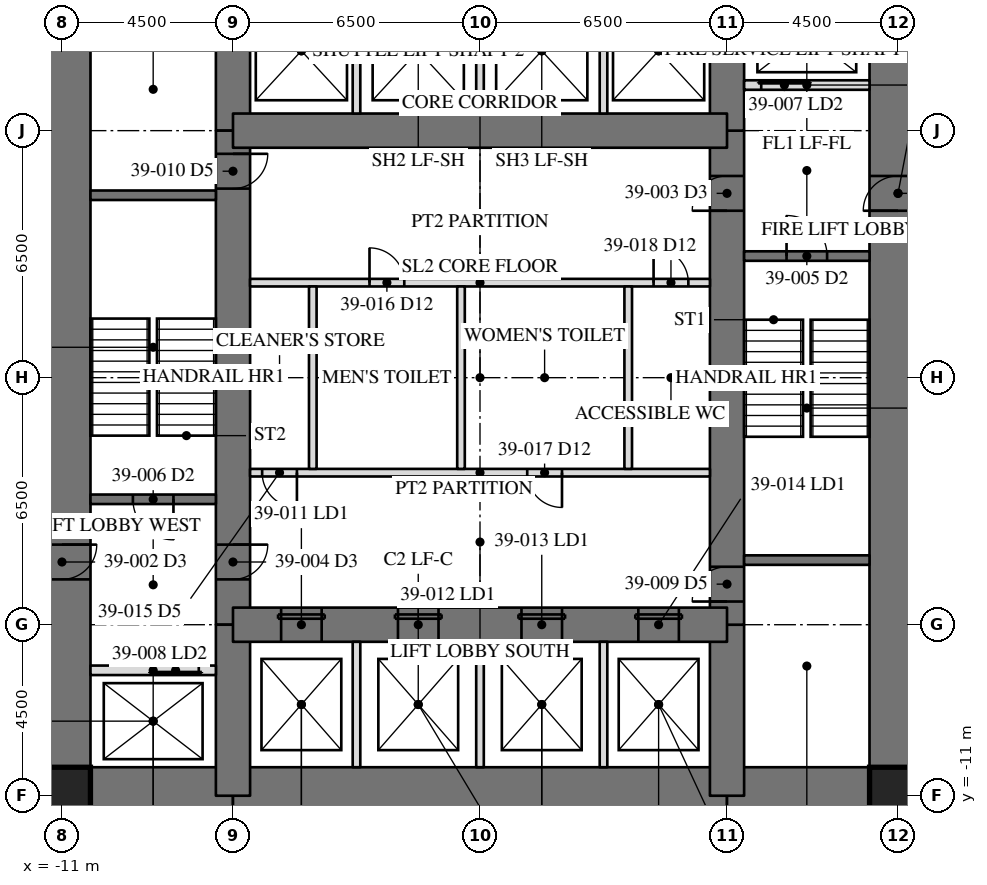
"""IFC4 building model, lengths in metres.
Left out: names, types, materials, properties, quantities, classifications, styles, units other than length and angle.
Written with IfcOpenShell. Run it as: python <this file> out.ifc"""

import sys

from ifc_helpers import new_model, si_unit, direction, frame, frame_2d, origin, origin_2d, place, context, subcontext, project, spatial, rectangle, hollow_rectangle, extrude, element, fill, save


model = new_model("IFC4")
c1 = context("Model", 3, precision=1e-05, world=origin(), true_north=direction((0.0, 1.0)))
c2 = subcontext(c1, "Body", "Model", "MODEL_VIEW")
j1 = project(units=[si_unit("LENGTHUNIT", "METRE"), si_unit("PLANEANGLEUNIT", "RADIAN")], contexts=[c1])
p1 = place(None, origin())
s1 = spatial("IfcSite", under=j1, at=p1, CompositionType="ELEMENT")
p2 = place(p1, origin())
s2 = spatial("IfcBuilding", under=s1, at=p2, CompositionType="ELEMENT")
p3 = place(p2, frame((0.0, 0.0, 166.4)))
s3 = spatial("IfcBuildingStorey", under=s2, at=p3, CompositionType="ELEMENT", Elevation=166.4)
p4 = place(p3, frame((11.0, -11.0, 0.0), z_axis=(0.0, 0.0, 1.0), x_axis=(0.0, 1.0, 0.0)))
e1 = element("IfcWall", 1, at=p4, inside=s3, PredefinedType="SHEAR", context=c2, shape_type="SweptSolid", body=[
    extrude(rectangle(XDim=22.0, YDim=1.5, at=frame_2d((11.0, 0.0))), origin(), (0.0, 0.0, 1.0), 4.1),
])
p5 = place(p4, frame((15.393, 0.0, 0.0)))
e2 = element("IfcOpeningElement", 2, at=p5, cuts=e1, PredefinedType="OPENING", context=c2, shape_type="SweptSolid", body=[
    extrude(rectangle(XDim=0.915, YDim=2.134, at=frame_2d((0.458, 1.067))), frame((0.0, 0.76, 0.0), z_axis=(0.0, -1.0, 0.0), x_axis=(1.0, 0.0, 0.0)), (0.0, 0.0, 1.0), 1.52),
])
p6 = place(p3, frame((-11.0, 11.0, 0.0), z_axis=(0.0, 0.0, 1.0), x_axis=(0.0, -1.0, 0.0)))
e3 = element("IfcWall", 3, at=p6, inside=s3, PredefinedType="SHEAR", context=c2, shape_type="SweptSolid", body=[
    extrude(rectangle(XDim=22.0, YDim=1.5, at=frame_2d((11.0, 0.0))), origin(), (0.0, 0.0, 1.0), 4.1),
])
p7 = place(p6, frame((15.393, 0.0, 0.0)))
e4 = element("IfcOpeningElement", 4, at=p7, cuts=e3, PredefinedType="OPENING", context=c2, shape_type="SweptSolid", body=[
    extrude(rectangle(XDim=0.915, YDim=2.134, at=frame_2d((0.458, 1.067))), frame((0.0, 0.76, 0.0), z_axis=(0.0, -1.0, 0.0), x_axis=(1.0, 0.0, 0.0)), (0.0, 0.0, 1.0), 1.52),
])
p8 = place(p3, frame((-11.0, -11.0, 0.0), z_axis=(0.0, 0.0, 1.0), x_axis=(1.0, 0.0, 0.0)))
e5 = element("IfcWall", 5, at=p8, inside=s3, PredefinedType="SHEAR", context=c2, shape_type="SweptSolid", body=[
    extrude(rectangle(XDim=4.5, YDim=1.5, at=frame_2d((2.25, 0.0))), origin(), (0.0, 0.0, 1.0), 4.1),
])
p9 = place(p3, frame((-6.5, -11.0, 0.0), z_axis=(0.0, 0.0, 1.0), x_axis=(1.0, 0.0, 0.0)))
e6 = element("IfcWall", 6, at=p9, inside=s3, PredefinedType="SHEAR", context=c2, shape_type="SweptSolid", body=[
    extrude(rectangle(XDim=13.0, YDim=1.5, at=frame_2d((6.5, 0.0))), origin(), (0.0, 0.0, 1.0), 4.1),
])
p10 = place(p3, frame((6.5, -11.0, 0.0), z_axis=(0.0, 0.0, 1.0), x_axis=(1.0, 0.0, 0.0)))
e7 = element("IfcWall", 7, at=p10, inside=s3, PredefinedType="SHEAR", context=c2, shape_type="SweptSolid", body=[
    extrude(rectangle(XDim=4.5, YDim=1.5, at=frame_2d((2.25, 0.0))), origin(), (0.0, 0.0, 1.0), 4.1),
])
p11 = place(p3, frame((6.5, -11.0, 0.0), z_axis=(0.0, 0.0, 1.0), x_axis=(0.0, 1.0, 0.0)))
e8 = element("IfcWall", 8, at=p11, inside=s3, PredefinedType="SHEAR", context=c2, shape_type="SweptSolid", body=[
    extrude(rectangle(XDim=4.5, YDim=0.9, at=frame_2d((2.25, 0.0))), origin(), (0.0, 0.0, 1.0), 4.1),
])
p12 = place(p3, frame((6.5, -6.5, 0.0), z_axis=(0.0, 0.0, 1.0), x_axis=(0.0, 1.0, 0.0)))
e9 = element("IfcWall", 9, at=p12, inside=s3, PredefinedType="SHEAR", context=c2, shape_type="SweptSolid", body=[
    extrude(rectangle(XDim=13.0, YDim=0.9, at=frame_2d((6.5, 0.0))), origin(), (0.0, 0.0, 1.0), 4.1),
])
p13 = place(p12, frame((10.893, 0.0, 0.0)))
e10 = element("IfcOpeningElement", 10, at=p13, cuts=e9, PredefinedType="OPENING", context=c2, shape_type="SweptSolid", body=[
    extrude(rectangle(XDim=0.915, YDim=2.134, at=frame_2d((0.458, 1.067))), frame((0.0, 0.46, 0.0), z_axis=(0.0, -1.0, 0.0), x_axis=(1.0, 0.0, 0.0)), (0.0, 0.0, 1.0), 0.92),
])
p14 = place(p12, frame((0.61, 0.0, 0.0)))
e11 = element("IfcOpeningElement", 11, at=p14, cuts=e9, PredefinedType="OPENING", context=c2, shape_type="SweptSolid", body=[
    extrude(rectangle(XDim=0.915, YDim=2.134, at=frame_2d((0.458, 1.067))), frame((0.0, 0.46, 0.0), z_axis=(0.0, -1.0, 0.0), x_axis=(1.0, 0.0, 0.0)), (0.0, 0.0, 1.0), 0.92),
])
for number, where, z_axis, x_axis in (
    (12, (6.5, 6.5, 0.0), (0.0, 0.0, 1.0), (0.0, 1.0, 0.0)),
    (13, (-6.5, 11.0, 0.0), (0.0, 0.0, 1.0), (0.0, -1.0, 0.0)),
):
    element("IfcWall", number, at=place(p3, frame(where, z_axis=z_axis, x_axis=x_axis)), inside=s3, PredefinedType="SHEAR", context=c2, shape_type="SweptSolid", body=[
        extrude(rectangle(XDim=4.5, YDim=0.9, at=frame_2d((2.25, 0.0))), origin(), (0.0, 0.0, 1.0), 4.1),
    ])
p15 = place(p3, frame((-6.5, 6.5, 0.0), z_axis=(0.0, 0.0, 1.0), x_axis=(0.0, -1.0, 0.0)))
e14 = element("IfcWall", 14, at=p15, inside=s3, PredefinedType="SHEAR", context=c2, shape_type="SweptSolid", body=[
    extrude(rectangle(XDim=13.0, YDim=0.9, at=frame_2d((6.5, 0.0))), origin(), (0.0, 0.0, 1.0), 4.1),
])
p16 = place(p15, frame((10.893, 0.0, 0.0)))
e15 = element("IfcOpeningElement", 15, at=p16, cuts=e14, PredefinedType="OPENING", context=c2, shape_type="SweptSolid", body=[
    extrude(rectangle(XDim=0.915, YDim=2.134, at=frame_2d((0.458, 1.067))), frame((0.0, 0.46, 0.0), z_axis=(0.0, -1.0, 0.0), x_axis=(1.0, 0.0, 0.0)), (0.0, 0.0, 1.0), 0.92),
])
p17 = place(p15, frame((0.61, 0.0, 0.0)))
e16 = element("IfcOpeningElement", 16, at=p17, cuts=e14, PredefinedType="OPENING", context=c2, shape_type="SweptSolid", body=[
    extrude(rectangle(XDim=0.915, YDim=2.134, at=frame_2d((0.458, 1.067))), frame((0.0, 0.46, 0.0), z_axis=(0.0, -1.0, 0.0), x_axis=(1.0, 0.0, 0.0)), (0.0, 0.0, 1.0), 0.92),
])
p18 = place(p3, frame((-6.5, -6.5, 0.0), z_axis=(0.0, 0.0, 1.0), x_axis=(0.0, -1.0, 0.0)))
e17 = element("IfcWall", 17, at=p18, inside=s3, PredefinedType="SHEAR", context=c2, shape_type="SweptSolid", body=[
    extrude(rectangle(XDim=4.5, YDim=0.9, at=frame_2d((2.25, 0.0))), origin(), (0.0, 0.0, 1.0), 4.1),
])
p19 = place(p3, frame((6.5, 6.5, 0.0), z_axis=(0.0, 0.0, 1.0), x_axis=(-1.0, 0.0, 0.0)))
e18 = element("IfcWall", 18, at=p19, inside=s3, PredefinedType="SHEAR", context=c2, shape_type="SweptSolid", body=[
    extrude(rectangle(XDim=13.0, YDim=0.9, at=frame_2d((6.5, 0.0))), origin(), (0.0, 0.0, 1.0), 4.1),
])
p20 = place(p3, frame((-6.5, -6.5, 0.0), z_axis=(0.0, 0.0, 1.0), x_axis=(1.0, 0.0, 0.0)))
e19 = element("IfcWall", 19, at=p20, inside=s3, PredefinedType="SHEAR", context=c2, shape_type="SweptSolid", body=[
    extrude(rectangle(XDim=13.0, YDim=0.9, at=frame_2d((6.5, 0.0))), origin(), (0.0, 0.0, 1.0), 4.1),
])
p21 = place(p20, frame((1.267, 0.0, 0.0)))
e20 = element("IfcOpeningElement", 20, at=p21, cuts=e19, PredefinedType="OPENING", context=c2, shape_type="SweptSolid", body=[
    extrude(rectangle(XDim=1.067, YDim=2.134, at=frame_2d((0.533, 1.067))), frame((0.0, 0.46, 0.0), z_axis=(0.0, -1.0, 0.0), x_axis=(1.0, 0.0, 0.0)), (0.0, 0.0, 1.0), 0.92),
])
p22 = place(p20, frame((4.342, 0.0, 0.0)))
e21 = element("IfcOpeningElement", 21, at=p22, cuts=e19, PredefinedType="OPENING", context=c2, shape_type="SweptSolid", body=[
    extrude(rectangle(XDim=1.067, YDim=2.134, at=frame_2d((0.533, 1.067))), frame((0.0, 0.46, 0.0), z_axis=(0.0, -1.0, 0.0), x_axis=(1.0, 0.0, 0.0)), (0.0, 0.0, 1.0), 0.92),
])
p23 = place(p20, frame((7.592, 0.0, 0.0)))
e22 = element("IfcOpeningElement", 22, at=p23, cuts=e19, PredefinedType="OPENING", context=c2, shape_type="SweptSolid", body=[
    extrude(rectangle(XDim=1.067, YDim=2.134, at=frame_2d((0.533, 1.067))), frame((0.0, 0.46, 0.0), z_axis=(0.0, -1.0, 0.0), x_axis=(1.0, 0.0, 0.0)), (0.0, 0.0, 1.0), 0.92),
])
p24 = place(p20, frame((10.667, 0.0, 0.0)))
e23 = element("IfcOpeningElement", 23, at=p24, cuts=e19, PredefinedType="OPENING", context=c2, shape_type="SweptSolid", body=[
    extrude(rectangle(XDim=1.067, YDim=2.134, at=frame_2d((0.533, 1.067))), frame((0.0, 0.46, 0.0), z_axis=(0.0, -1.0, 0.0), x_axis=(1.0, 0.0, 0.0)), (0.0, 0.0, 1.0), 0.92),
])
for number, where, z_axis, x_axis in (
    (24, (-11.0, -11.0, 0.0), (0.0, 0.0, 1.0), (1.0, 0.0, 0.0)),
    (25, (11.0, -11.0, 0.0), (0.0, 0.0, 1.0), (1.0, 0.0, 0.0)),
):
    element("IfcColumn", number, at=place(p3, frame(where, z_axis=z_axis, x_axis=x_axis)), inside=s3, PredefinedType="COLUMN", context=c2, shape_type="SweptSolid", body=[
        extrude(hollow_rectangle(XDim=1.499, YDim=1.499, WallThickness=0.102, at=origin_2d()), origin(), (0.0, 0.0, 1.0), 4.1),
    ])
for number, where, z_axis, x_axis in (
    (26, (6.95, -4.8, 0.0), (0.0, 0.0, 1.0), (1.0, 0.0, 0.0)),
    (27, (-6.95, 4.8, 0.0), (0.0, 0.0, 1.0), (-1.0, 0.0, 0.0)),
):
    element("IfcWall", number, at=place(p3, frame(where, z_axis=z_axis, x_axis=x_axis)), inside=s3, PredefinedType="SOLIDWALL", context=c2, shape_type="SweptSolid", body=[
        extrude(rectangle(XDim=3.3, YDim=0.25, at=frame_2d((1.65, 0.0))), origin(), (0.0, 0.0, 1.0), 3.91),
    ])
p25 = place(p3, frame((6.95, 3.2, 0.0), z_axis=(0.0, 0.0, 1.0), x_axis=(1.0, 0.0, 0.0)))
e28 = element("IfcWall", 28, at=p25, inside=s3, PredefinedType="SOLIDWALL", context=c2, shape_type="SweptSolid", body=[
    extrude(rectangle(XDim=3.3, YDim=0.25, at=frame_2d((1.65, 0.0))), origin(), (0.0, 0.0, 1.0), 3.91),
])
p26 = place(p25, frame((1.116, 0.0, 0.0)))
e29 = element("IfcOpeningElement", 29, at=p26, cuts=e28, PredefinedType="OPENING", context=c2, shape_type="SweptSolid", body=[
    extrude(rectangle(XDim=1.067, YDim=2.134, at=frame_2d((0.533, 1.067))), frame((0.0, 0.135, 0.0), z_axis=(0.0, -1.0, 0.0), x_axis=(1.0, 0.0, 0.0)), (0.0, 0.0, 1.0), 0.27),
])
p27 = place(p3, frame((-6.95, -3.2, 0.0), z_axis=(0.0, 0.0, 1.0), x_axis=(-1.0, 0.0, 0.0)))
e30 = element("IfcWall", 30, at=p27, inside=s3, PredefinedType="SOLIDWALL", context=c2, shape_type="SweptSolid", body=[
    extrude(rectangle(XDim=3.3, YDim=0.25, at=frame_2d((1.65, 0.0))), origin(), (0.0, 0.0, 1.0), 3.91),
])
p28 = place(p27, frame((1.116, 0.0, 0.0)))
e31 = element("IfcOpeningElement", 31, at=p28, cuts=e30, PredefinedType="OPENING", context=c2, shape_type="SweptSolid", body=[
    extrude(rectangle(XDim=1.067, YDim=2.134, at=frame_2d((0.533, 1.067))), frame((0.0, 0.135, 0.0), z_axis=(0.0, -1.0, 0.0), x_axis=(1.0, 0.0, 0.0)), (0.0, 0.0, 1.0), 0.27),
])
p29 = place(p3, frame((6.95, 7.7, 0.0), z_axis=(0.0, 0.0, 1.0), x_axis=(1.0, 0.0, 0.0)))
e32 = element("IfcWall", 32, at=p29, inside=s3, PredefinedType="PARTITIONING", context=c2, shape_type="SweptSolid", body=[
    extrude(rectangle(XDim=3.3, YDim=0.25, at=frame_2d((1.65, 0.0))), origin(), (0.0, 0.0, 1.0), 3.91),
])
p30 = place(p29, frame((0.45, 0.0, 0.0)))
e33 = element("IfcOpeningElement", 33, at=p30, cuts=e32, PredefinedType="OPENING", context=c2, shape_type="SweptSolid", body=[
    extrude(rectangle(XDim=1.219, YDim=2.134, at=frame_2d((0.609, 1.067))), frame((0.0, 0.135, 0.0), z_axis=(0.0, -1.0, 0.0), x_axis=(1.0, 0.0, 0.0)), (0.0, 0.0, 1.0), 0.27),
])
p31 = place(p3, frame((-6.95, -7.7, 0.0), z_axis=(0.0, 0.0, 1.0), x_axis=(-1.0, 0.0, 0.0)))
e34 = element("IfcWall", 34, at=p31, inside=s3, PredefinedType="PARTITIONING", context=c2, shape_type="SweptSolid", body=[
    extrude(rectangle(XDim=3.3, YDim=0.25, at=frame_2d((1.65, 0.0))), origin(), (0.0, 0.0, 1.0), 3.91),
])
p32 = place(p31, frame((0.45, 0.0, 0.0)))
e35 = element("IfcOpeningElement", 35, at=p32, cuts=e34, PredefinedType="OPENING", context=c2, shape_type="SweptSolid", body=[
    extrude(rectangle(XDim=1.219, YDim=2.134, at=frame_2d((0.609, 1.067))), frame((0.0, 0.135, 0.0), z_axis=(0.0, -1.0, 0.0), x_axis=(1.0, 0.0, 0.0)), (0.0, 0.0, 1.0), 0.27),
])
p33 = place(p3, frame((-6.05, 2.5, 0.0), z_axis=(0.0, 0.0, 1.0), x_axis=(1.0, 0.0, 0.0)))
e36 = element("IfcWall", 36, at=p33, inside=s3, PredefinedType="PARTITIONING", context=c2, shape_type="SweptSolid", body=[
    extrude(rectangle(XDim=12.1, YDim=0.2, at=frame_2d((6.05, 0.0))), origin(), (0.0, 0.0, 1.0), 3.91),
])
p34 = place(p33, frame((3.143, 0.0, 0.0)))
e37 = element("IfcOpeningElement", 37, at=p34, cuts=e36, PredefinedType="OPENING", context=c2, shape_type="SweptSolid", body=[
    extrude(rectangle(XDim=0.915, YDim=2.134, at=frame_2d((0.458, 1.067))), frame((0.0, 0.11, 0.0), z_axis=(0.0, -1.0, 0.0), x_axis=(1.0, 0.0, 0.0)), (0.0, 0.0, 1.0), 0.22),
])
p35 = place(p33, frame((10.617, 0.0, 0.0)))
e38 = element("IfcOpeningElement", 38, at=p35, cuts=e36, PredefinedType="OPENING", context=c2, shape_type="SweptSolid", body=[
    extrude(rectangle(XDim=0.915, YDim=2.134, at=frame_2d((0.458, 1.067))), frame((0.0, 0.11, 0.0), z_axis=(0.0, -1.0, 0.0), x_axis=(1.0, 0.0, 0.0)), (0.0, 0.0, 1.0), 0.22),
])
p36 = place(p3, frame((6.05, -2.5, 0.0), z_axis=(0.0, 0.0, 1.0), x_axis=(-1.0, 0.0, 0.0)))
e39 = element("IfcWall", 39, at=p36, inside=s3, PredefinedType="PARTITIONING", context=c2, shape_type="SweptSolid", body=[
    extrude(rectangle(XDim=12.1, YDim=0.2, at=frame_2d((6.05, 0.0))), origin(), (0.0, 0.0, 1.0), 3.91),
])
p37 = place(p36, frame((10.867, 0.0, 0.0)))
e40 = element("IfcOpeningElement", 40, at=p37, cuts=e39, PredefinedType="OPENING", context=c2, shape_type="SweptSolid", body=[
    extrude(rectangle(XDim=0.915, YDim=2.134, at=frame_2d((0.458, 1.067))), frame((0.0, 0.11, 0.0), z_axis=(0.0, -1.0, 0.0), x_axis=(1.0, 0.0, 0.0)), (0.0, 0.0, 1.0), 0.22),
])
p38 = place(p36, frame((3.893, 0.0, 0.0)))
e41 = element("IfcOpeningElement", 41, at=p38, cuts=e39, PredefinedType="OPENING", context=c2, shape_type="SweptSolid", body=[
    extrude(rectangle(XDim=0.915, YDim=2.134, at=frame_2d((0.458, 1.067))), frame((0.0, 0.11, 0.0), z_axis=(0.0, -1.0, 0.0), x_axis=(1.0, 0.0, 0.0)), (0.0, 0.0, 1.0), 0.22),
])
for number, where, z_axis, x_axis in (
    (42, (-3.25, 6.95, 0.0), (0.0, 0.0, 1.0), (0.0, 1.0, 0.0)),
    (43, (0.0, 6.95, 0.0), (0.0, 0.0, 1.0), (0.0, 1.0, 0.0)),
    (44, (3.25, 6.95, 0.0), (0.0, 0.0, 1.0), (0.0, 1.0, 0.0)),
    (45, (-3.25, -10.25, 0.0), (0.0, 0.0, 1.0), (0.0, 1.0, 0.0)),
    (46, (0.0, -10.25, 0.0), (0.0, 0.0, 1.0), (0.0, 1.0, 0.0)),
    (47, (3.25, -10.25, 0.0), (0.0, 0.0, 1.0), (0.0, 1.0, 0.0)),
):
    element("IfcWall", number, at=place(p3, frame(where, z_axis=z_axis, x_axis=x_axis)), inside=s3, PredefinedType="PARTITIONING", context=c2, shape_type="SweptSolid", body=[
        extrude(rectangle(XDim=3.3, YDim=0.2, at=frame_2d((1.65, 0.0))), origin(), (0.0, 0.0, 1.0), 3.91),
    ])
for number, where, z_axis, x_axis in (
    (48, (-4.4, -2.4, 0.0), (0.0, 0.0, 1.0), (0.0, 1.0, 0.0)),
    (49, (-0.5, -2.4, 0.0), (0.0, 0.0, 1.0), (0.0, 1.0, 0.0)),
    (50, (3.9, -2.4, 0.0), (0.0, 0.0, 1.0), (0.0, 1.0, 0.0)),
):
    element("IfcWall", number, at=place(p3, frame(where, z_axis=z_axis, x_axis=x_axis)), inside=s3, PredefinedType="PARTITIONING", context=c2, shape_type="SweptSolid", body=[
        extrude(rectangle(XDim=4.8, YDim=0.2, at=frame_2d((2.4, 0.0))), origin(), (0.0, 0.0, 1.0), 3.91),
    ])
p39 = place(p13, origin())
e51 = element("IfcDoor", 51, at=p39, inside=s3, OperationType="SINGLE_SWING_RIGHT", PredefinedType="DOOR", context=c2, shape_type="SweptSolid", body=[
    extrude(rectangle(XDim=0.915, YDim=2.134, at=frame_2d((0.458, 1.067))), frame((0.0, -0.375, 0.0), z_axis=(0.0, -1.0, 0.0), x_axis=(1.0, 0.0, 0.0)), (0.0, 0.0, 1.0), 0.05),
])
fill(e10, e51)
p40 = place(p16, origin())
e52 = element("IfcDoor", 52, at=p40, inside=s3, OperationType="SINGLE_SWING_RIGHT", PredefinedType="DOOR", context=c2, shape_type="SweptSolid", body=[
    extrude(rectangle(XDim=0.915, YDim=2.134, at=frame_2d((0.458, 1.067))), frame((0.0, -0.375, 0.0), z_axis=(0.0, -1.0, 0.0), x_axis=(1.0, 0.0, 0.0)), (0.0, 0.0, 1.0), 0.05),
])
fill(e15, e52)
p41 = place(p26, origin())
e53 = element("IfcDoor", 53, at=p41, inside=s3, OperationType="SINGLE_SWING_LEFT", PredefinedType="DOOR", context=c2, shape_type="SweptSolid", body=[
    extrude(rectangle(XDim=1.067, YDim=2.134, at=frame_2d((0.533, 1.067))), frame((0.0, 0.025, 0.0), z_axis=(0.0, -1.0, 0.0), x_axis=(1.0, 0.0, 0.0)), (0.0, 0.0, 1.0), 0.05),
])
fill(e29, e53)
p42 = place(p28, origin())
e54 = element("IfcDoor", 54, at=p42, inside=s3, OperationType="SINGLE_SWING_LEFT", PredefinedType="DOOR", context=c2, shape_type="SweptSolid", body=[
    extrude(rectangle(XDim=1.067, YDim=2.134, at=frame_2d((0.533, 1.067))), frame((0.0, 0.025, 0.0), z_axis=(0.0, -1.0, 0.0), x_axis=(1.0, 0.0, 0.0)), (0.0, 0.0, 1.0), 0.05),
])
fill(e31, e54)
p43 = place(p30, origin())
e55 = element("IfcDoor", 55, at=p43, inside=s3, OperationType="SLIDING_TO_LEFT", PredefinedType="DOOR", context=c2, shape_type="SweptSolid", body=[
    extrude(rectangle(XDim=1.219, YDim=2.134, at=frame_2d((0.609, 1.067))), frame((0.0, 0.025, 0.0), z_axis=(0.0, -1.0, 0.0), x_axis=(1.0, 0.0, 0.0)), (0.0, 0.0, 1.0), 0.05),
])
fill(e33, e55)
p44 = place(p32, origin())
e56 = element("IfcDoor", 56, at=p44, inside=s3, OperationType="SLIDING_TO_LEFT", PredefinedType="DOOR", context=c2, shape_type="SweptSolid", body=[
    extrude(rectangle(XDim=1.219, YDim=2.134, at=frame_2d((0.609, 1.067))), frame((0.0, 0.025, 0.0), z_axis=(0.0, -1.0, 0.0), x_axis=(1.0, 0.0, 0.0)), (0.0, 0.0, 1.0), 0.05),
])
fill(e35, e56)
p45 = place(p14, origin())
e57 = element("IfcDoor", 57, at=p45, inside=s3, OperationType="SINGLE_SWING_RIGHT", PredefinedType="DOOR", context=c2, shape_type="SweptSolid", body=[
    extrude(rectangle(XDim=0.915, YDim=2.134, at=frame_2d((0.458, 1.067))), frame((0.0, -0.375, 0.0), z_axis=(0.0, -1.0, 0.0), x_axis=(1.0, 0.0, 0.0)), (0.0, 0.0, 1.0), 0.05),
])
fill(e11, e57)
p46 = place(p17, origin())
e58 = element("IfcDoor", 58, at=p46, inside=s3, OperationType="SINGLE_SWING_RIGHT", PredefinedType="DOOR", context=c2, shape_type="SweptSolid", body=[
    extrude(rectangle(XDim=0.915, YDim=2.134, at=frame_2d((0.458, 1.067))), frame((0.0, -0.375, 0.0), z_axis=(0.0, -1.0, 0.0), x_axis=(1.0, 0.0, 0.0)), (0.0, 0.0, 1.0), 0.05),
])
fill(e16, e58)
p47 = place(p21, origin())
e59 = element("IfcDoor", 59, at=p47, inside=s3, OperationType="SLIDING_TO_LEFT", PredefinedType="DOOR", context=c2, shape_type="SweptSolid", body=[
    extrude(rectangle(XDim=1.067, YDim=2.134, at=frame_2d((0.533, 1.067))), frame((0.0, -0.375, 0.0), z_axis=(0.0, -1.0, 0.0), x_axis=(1.0, 0.0, 0.0)), (0.0, 0.0, 1.0), 0.05),
])
fill(e20, e59)
p48 = place(p22, origin())
e60 = element("IfcDoor", 60, at=p48, inside=s3, OperationType="SLIDING_TO_LEFT", PredefinedType="DOOR", context=c2, shape_type="SweptSolid", body=[
    extrude(rectangle(XDim=1.067, YDim=2.134, at=frame_2d((0.533, 1.067))), frame((0.0, -0.375, 0.0), z_axis=(0.0, -1.0, 0.0), x_axis=(1.0, 0.0, 0.0)), (0.0, 0.0, 1.0), 0.05),
])
fill(e21, e60)
p49 = place(p23, origin())
e61 = element("IfcDoor", 61, at=p49, inside=s3, OperationType="SLIDING_TO_LEFT", PredefinedType="DOOR", context=c2, shape_type="SweptSolid", body=[
    extrude(rectangle(XDim=1.067, YDim=2.134, at=frame_2d((0.533, 1.067))), frame((0.0, -0.375, 0.0), z_axis=(0.0, -1.0, 0.0), x_axis=(1.0, 0.0, 0.0)), (0.0, 0.0, 1.0), 0.05),
])
fill(e22, e61)
p50 = place(p24, origin())
e62 = element("IfcDoor", 62, at=p50, inside=s3, OperationType="SLIDING_TO_LEFT", PredefinedType="DOOR", context=c2, shape_type="SweptSolid", body=[
    extrude(rectangle(XDim=1.067, YDim=2.134, at=frame_2d((0.533, 1.067))), frame((0.0, -0.375, 0.0), z_axis=(0.0, -1.0, 0.0), x_axis=(1.0, 0.0, 0.0)), (0.0, 0.0, 1.0), 0.05),
])
fill(e23, e62)
p51 = place(p37, origin())
e63 = element("IfcDoor", 63, at=p51, inside=s3, OperationType="SINGLE_SWING_RIGHT", PredefinedType="DOOR", context=c2, shape_type="SweptSolid", body=[
    extrude(rectangle(XDim=0.915, YDim=2.134, at=frame_2d((0.458, 1.067))), frame((0.0, 0.025, 0.0), z_axis=(0.0, -1.0, 0.0), x_axis=(1.0, 0.0, 0.0)), (0.0, 0.0, 1.0), 0.05),
])
fill(e40, e63)
p52 = place(p34, origin())
e64 = element("IfcDoor", 64, at=p52, inside=s3, OperationType="SINGLE_SWING_LEFT", PredefinedType="DOOR", context=c2, shape_type="SweptSolid", body=[
    extrude(rectangle(XDim=0.915, YDim=2.134, at=frame_2d((0.458, 1.067))), frame((0.0, 0.025, 0.0), z_axis=(0.0, -1.0, 0.0), x_axis=(1.0, 0.0, 0.0)), (0.0, 0.0, 1.0), 0.05),
])
fill(e37, e64)
p53 = place(p38, origin())
e65 = element("IfcDoor", 65, at=p53, inside=s3, OperationType="SINGLE_SWING_LEFT", PredefinedType="DOOR", context=c2, shape_type="SweptSolid", body=[
    extrude(rectangle(XDim=0.915, YDim=2.134, at=frame_2d((0.458, 1.067))), frame((0.0, 0.025, 0.0), z_axis=(0.0, -1.0, 0.0), x_axis=(1.0, 0.0, 0.0)), (0.0, 0.0, 1.0), 0.05),
])
fill(e41, e65)
p54 = place(p35, origin())
e66 = element("IfcDoor", 66, at=p54, inside=s3, OperationType="SINGLE_SWING_LEFT", PredefinedType="DOOR", context=c2, shape_type="SweptSolid", body=[
    extrude(rectangle(XDim=0.915, YDim=2.134, at=frame_2d((0.458, 1.067))), frame((0.0, 0.025, 0.0), z_axis=(0.0, -1.0, 0.0), x_axis=(1.0, 0.0, 0.0)), (0.0, 0.0, 1.0), 0.05),
])
fill(e38, e66)
save(model, sys.argv[1])
